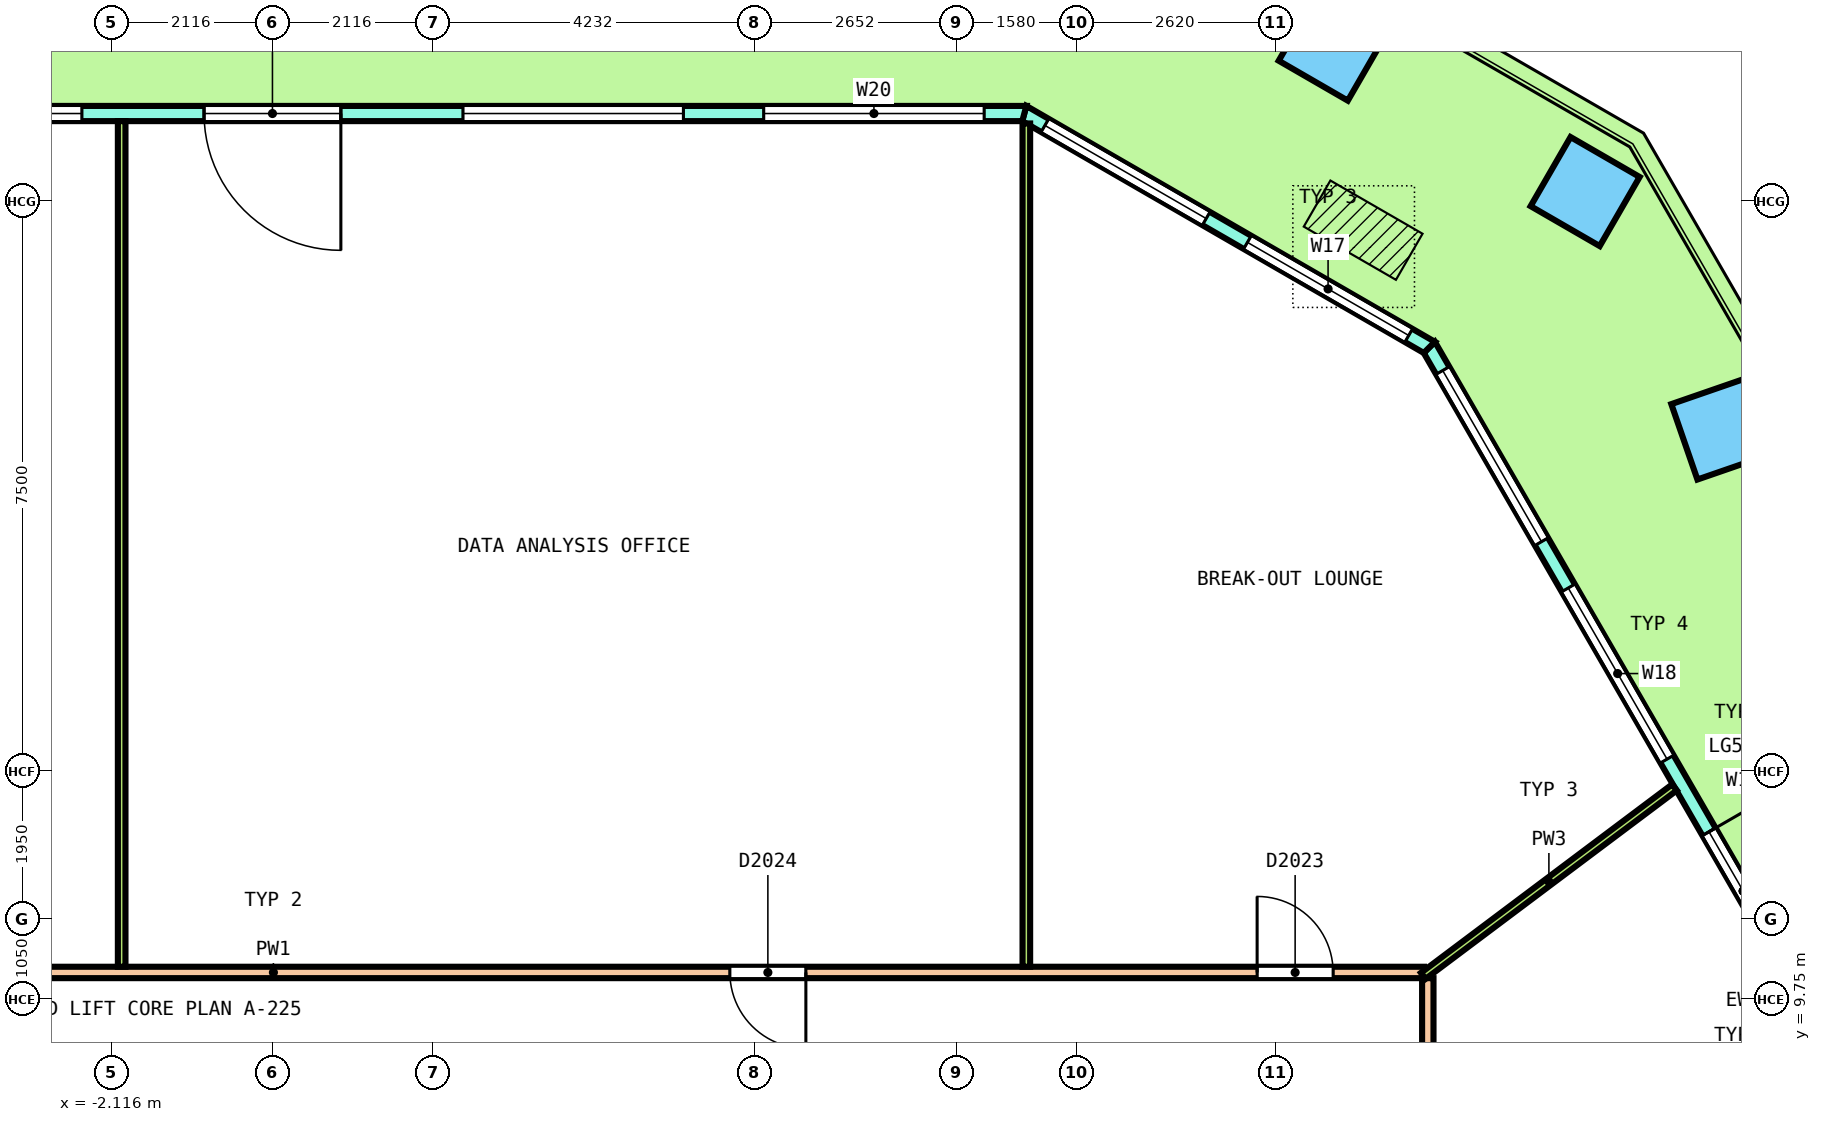
"""IFC4 building model, lengths in metres.
Left out: names, types, materials, properties, quantities, classifications, styles, units other than length and angle.
Written with IfcOpenShell. Run it as: python <this file> out.ifc"""

import sys

from ifc_helpers import new_model, si_unit, direction, frame, frame_2d, origin, origin_2d, place, context, subcontext, project, spatial, polyline, rectangle, outline, extrude, element, fill, save


model = new_model("IFC4")
c1 = context("Model", 3, precision=1e-05, world=origin(), true_north=direction((0.0, 1.0)))
c2 = subcontext(c1, "Body", "Model", "MODEL_VIEW")
j1 = project(units=[si_unit("LENGTHUNIT", "METRE"), si_unit("PLANEANGLEUNIT", "RADIAN")], contexts=[c1])
p1 = place(None, origin())
s1 = spatial("IfcSite", under=j1, at=p1, CompositionType="ELEMENT")
p2 = place(p1, origin())
s2 = spatial("IfcBuilding", under=s1, at=p2, CompositionType="ELEMENT")
p3 = place(p2, frame((0.0, 0.0, 241.4)))
s3 = spatial("IfcBuildingStorey", under=s2, at=p3, CompositionType="ELEMENT", Elevation=241.4)
p4 = place(p3, frame((19.072, 17.252, 0.0), z_axis=(0.032688717128, 0.006283720675, 0.99944582776), x_axis=(-0.499189907536, 0.866424302438, 0.010879538516)))
e1 = element("IfcColumn", 1, at=p4, inside=s3, PredefinedType="COLUMN", context=c2, shape_type="SweptSolid", body=[
    extrude(rectangle(XDim=1.05, YDim=1.05, at=origin_2d()), origin(), (0.0, 0.0, 1.0), 3.652),
])
for number, where, z_axis, x_axis in (
    (2, (17.27, 20.373, 0.0), (0.036, 0.0, 0.999), (-0.865, 0.5, 0.031)),
    (3, (13.956, 22.287, 0.0), (0.036, 0.0, 0.999), (-0.865, 0.5, 0.031)),
):
    element("IfcColumn", number, at=place(p3, frame(where, z_axis=z_axis, x_axis=x_axis)), inside=s3, PredefinedType="COLUMN", context=c2, shape_type="SweptSolid", body=[
        extrude(rectangle(XDim=1.05, YDim=1.05, at=origin_2d()), origin(), (0.0, 0.0, 1.0), 3.653),
    ])
p5 = place(p3, frame((23.479, 4.019, 0.0), z_axis=(0.0, 0.0, 1.0), x_axis=(-0.500000529106, 0.866025098304, 0.0)))
e4 = element("IfcWall", 4, at=p5, inside=s3, PredefinedType="SOLIDWALL", context=c2, shape_type="SweptSolid", body=[
    extrude(outline(polyline([(-0.027, -0.1), (1.009, -0.1), (2.044, -0.1), (3.08, -0.1), (4.116, -0.1), (5.152, -0.1), (6.187, -0.1), (7.223, -0.1), (8.259, -0.1), (9.294, -0.1), (10.33, -0.1), (11.365, -0.1), (12.401, -0.1), (13.437, -0.1), (14.473, -0.1), (15.508, -0.1), (16.544, -0.1), (16.49, 0.1), (15.461, 0.1), (14.432, 0.1), (13.403, 0.1), (12.375, 0.1), (11.345, 0.1), (10.316, 0.1), (9.288, 0.1), (8.259, 0.1), (7.229, 0.1), (6.201, 0.1), (5.172, 0.1), (4.143, 0.1), (3.114, 0.1), (2.085, 0.1), (1.056, 0.1), (0.027, 0.1), (-0.027, -0.1)])), origin(), (0.0, 0.0, 1.0), 3.7),
])
p6 = place(p5, frame((0.352, 0.0, 0.1)))
e5 = element("IfcOpeningElement", 5, at=p6, cuts=e4, PredefinedType="OPENING", context=c2, shape_type="SweptSolid", body=[
    extrude(rectangle(XDim=2.6, YDim=2.65, at=frame_2d((1.3, 1.325))), frame((0.0, 0.11, 0.0), z_axis=(0.0, -1.0, 0.0), x_axis=(1.0, 0.0, 0.0)), (0.0, 0.0, 1.0), 0.22),
])
p7 = place(p5, frame((3.655, 0.0, 0.1)))
e6 = element("IfcOpeningElement", 6, at=p7, cuts=e4, PredefinedType="OPENING", context=c2, shape_type="SweptSolid", body=[
    extrude(rectangle(XDim=2.6, YDim=2.65, at=frame_2d((1.3, 1.325))), frame((0.0, 0.11, 0.0), z_axis=(0.0, -1.0, 0.0), x_axis=(1.0, 0.0, 0.0)), (0.0, 0.0, 1.0), 0.22),
])
p8 = place(p5, frame((7.359, 0.0, 0.0)))
e7 = element("IfcOpeningElement", 7, at=p8, cuts=e4, PredefinedType="OPENING", context=c2, shape_type="SweptSolid", body=[
    extrude(rectangle(XDim=1.8, YDim=2.4, at=frame_2d((0.9, 1.2))), frame((0.0, 0.11, 0.0), z_axis=(0.0, -1.0, 0.0), x_axis=(1.0, 0.0, 0.0)), (0.0, 0.0, 1.0), 0.22),
])
p9 = place(p5, frame((7.359, 0.0, 2.55)))
e8 = element("IfcOpeningElement", 8, at=p9, cuts=e4, PredefinedType="OPENING", context=c2, shape_type="SweptSolid", body=[
    extrude(rectangle(XDim=1.8, YDim=0.2, at=frame_2d((0.9, 0.1))), frame((0.0, 0.11, 0.0), z_axis=(0.0, -1.0, 0.0), x_axis=(1.0, 0.0, 0.0)), (0.0, 0.0, 1.0), 0.22),
])
p10 = place(p5, frame((10.262, 0.0, 0.1)))
e9 = element("IfcOpeningElement", 9, at=p10, cuts=e4, PredefinedType="OPENING", context=c2, shape_type="SweptSolid", body=[
    extrude(rectangle(XDim=2.6, YDim=2.65, at=frame_2d((1.3, 1.325))), frame((0.0, 0.11, 0.0), z_axis=(0.0, -1.0, 0.0), x_axis=(1.0, 0.0, 0.0)), (0.0, 0.0, 1.0), 0.22),
])
p11 = place(p5, frame((13.565, 0.0, 0.1)))
e10 = element("IfcOpeningElement", 10, at=p11, cuts=e4, PredefinedType="OPENING", context=c2, shape_type="SweptSolid", body=[
    extrude(rectangle(XDim=2.6, YDim=2.65, at=frame_2d((1.3, 1.325))), frame((0.0, 0.11, 0.0), z_axis=(0.0, -1.0, 0.0), x_axis=(1.0, 0.0, 0.0)), (0.0, 0.0, 1.0), 0.22),
])
p12 = place(p3, frame((15.22, 18.323, 0.0), z_axis=(0.0, 0.0, 1.0), x_axis=(-0.866029647142, 0.499992650217, 0.0)))
e11 = element("IfcWall", 11, at=p12, inside=s3, PredefinedType="SOLIDWALL", context=c2, shape_type="SweptSolid", body=[
    extrude(outline(polyline([(-0.027, -0.1), (1.008, -0.1), (2.042, -0.1), (3.076, -0.1), (4.111, -0.1), (5.145, -0.1), (6.18, -0.1), (6.126, 0.1), (5.109, 0.1), (4.093, 0.1), (3.076, 0.1), (2.06, 0.1), (1.043, 0.1), (0.027, 0.1), (-0.027, -0.1)])), origin(), (0.0, 0.0, 1.0), 3.7),
])
p13 = place(p12, frame((0.313, 0.0, 0.1)))
e12 = element("IfcOpeningElement", 12, at=p13, cuts=e11, PredefinedType="OPENING", context=c2, shape_type="SweptSolid", body=[
    extrude(rectangle(XDim=2.45, YDim=2.65, at=frame_2d((1.225, 1.325))), frame((0.0, 0.11, 0.0), z_axis=(0.0, -1.0, 0.0), x_axis=(1.0, 0.0, 0.0)), (0.0, 0.0, 1.0), 0.22),
])
p14 = place(p12, frame((3.39, 0.0, 0.1)))
e13 = element("IfcOpeningElement", 13, at=p14, cuts=e11, PredefinedType="OPENING", context=c2, shape_type="SweptSolid", body=[
    extrude(rectangle(XDim=2.45, YDim=2.65, at=frame_2d((1.225, 1.325))), frame((0.0, 0.11, 0.0), z_axis=(0.0, -1.0, 0.0), x_axis=(1.0, 0.0, 0.0)), (0.0, 0.0, 1.0), 0.22),
])
p15 = place(p3, frame((9.892, 21.4, 0.0), z_axis=(0.0, 0.0, 1.0), x_axis=(-1.0, 0.0, 0.0)))
e14 = element("IfcWall", 14, at=p15, inside=s3, PredefinedType="SOLIDWALL", context=c2, shape_type="SweptSolid", body=[
    extrude(outline(polyline([(-0.027, -0.1), (1.017, -0.1), (2.061, -0.1), (3.105, -0.1), (4.149, -0.1), (5.193, -0.1), (6.238, -0.1), (7.281, -0.1), (8.325, -0.1), (9.37, -0.1), (10.414, -0.1), (11.458, -0.1), (12.502, -0.1), (13.546, -0.1), (14.59, -0.1), (15.634, -0.1), (16.678, -0.1), (17.722, -0.1), (18.766, -0.1), (19.81, -0.1), (19.756, 0.1), (18.718, 0.1), (17.679, 0.1), (16.641, 0.1), (15.603, 0.1), (14.564, 0.1), (13.526, 0.1), (12.488, 0.1), (11.449, 0.1), (10.411, 0.1), (9.372, 0.1), (8.334, 0.1), (7.296, 0.1), (6.257, 0.1), (5.219, 0.1), (4.18, 0.1), (3.142, 0.1), (2.104, 0.1), (1.065, 0.1), (0.027, 0.1), (-0.027, -0.1)])), origin(), (0.0, 0.0, 1.0), 3.7),
])
p16 = place(p15, frame((0.528, 0.0, 0.1)))
e15 = element("IfcOpeningElement", 15, at=p16, cuts=e14, PredefinedType="OPENING", context=c2, shape_type="SweptSolid", body=[
    extrude(rectangle(XDim=2.9, YDim=2.65, at=frame_2d((1.45, 1.325))), frame((0.0, 0.11, 0.0), z_axis=(0.0, -1.0, 0.0), x_axis=(1.0, 0.0, 0.0)), (0.0, 0.0, 1.0), 0.22),
])
p17 = place(p15, frame((4.485, 0.0, 0.1)))
e16 = element("IfcOpeningElement", 16, at=p17, cuts=e14, PredefinedType="OPENING", context=c2, shape_type="SweptSolid", body=[
    extrude(rectangle(XDim=2.9, YDim=2.65, at=frame_2d((1.45, 1.325))), frame((0.0, 0.11, 0.0), z_axis=(0.0, -1.0, 0.0), x_axis=(1.0, 0.0, 0.0)), (0.0, 0.0, 1.0), 0.22),
])
p18 = place(p15, frame((8.991, 0.0, 0.0)))
e17 = element("IfcOpeningElement", 17, at=p18, cuts=e14, PredefinedType="OPENING", context=c2, shape_type="SweptSolid", body=[
    extrude(rectangle(XDim=1.8, YDim=2.4, at=frame_2d((0.9, 1.2))), frame((0.0, 0.11, 0.0), z_axis=(0.0, -1.0, 0.0), x_axis=(1.0, 0.0, 0.0)), (0.0, 0.0, 1.0), 0.22),
])
p19 = place(p15, frame((8.991, 0.0, 2.55)))
e18 = element("IfcOpeningElement", 18, at=p19, cuts=e14, PredefinedType="OPENING", context=c2, shape_type="SweptSolid", body=[
    extrude(rectangle(XDim=1.8, YDim=0.2, at=frame_2d((0.9, 0.1))), frame((0.0, 0.11, 0.0), z_axis=(0.0, -1.0, 0.0), x_axis=(1.0, 0.0, 0.0)), (0.0, 0.0, 1.0), 0.22),
])
p20 = place(p15, frame((12.398, 0.0, 0.1)))
e19 = element("IfcOpeningElement", 19, at=p20, cuts=e14, PredefinedType="OPENING", context=c2, shape_type="SweptSolid", body=[
    extrude(rectangle(XDim=2.9, YDim=2.65, at=frame_2d((1.45, 1.325))), frame((0.0, 0.11, 0.0), z_axis=(0.0, -1.0, 0.0), x_axis=(1.0, 0.0, 0.0)), (0.0, 0.0, 1.0), 0.22),
])
p21 = place(p15, frame((16.355, 0.0, 0.1)))
e20 = element("IfcOpeningElement", 20, at=p21, cuts=e14, PredefinedType="OPENING", context=c2, shape_type="SweptSolid", body=[
    extrude(rectangle(XDim=2.9, YDim=2.65, at=frame_2d((1.45, 1.325))), frame((0.0, 0.11, 0.0), z_axis=(0.0, -1.0, 0.0), x_axis=(1.0, 0.0, 0.0)), (0.0, 0.0, 1.0), 0.22),
])
p22 = place(p3, frame((15.2, -7.075, 0.0), z_axis=(0.0, 0.0, 1.0), x_axis=(0.0, 1.0, 0.0)))
e21 = element("IfcWall", 21, at=p22, inside=s3, PredefinedType="PARTITIONING", context=c2, shape_type="SweptSolid", body=[
    extrude(rectangle(XDim=17.1, YDim=0.15, at=frame_2d((8.55, 0.0))), origin(), (0.0, 0.0, 1.0), 2.8),
])
p23 = place(p22, frame((7.418, 0.0, 0.0)))
e22 = element("IfcOpeningElement", 22, at=p23, cuts=e21, PredefinedType="OPENING", context=c2, shape_type="SweptSolid", body=[
    extrude(rectangle(XDim=1.2, YDim=2.1, at=frame_2d((0.6, 1.05))), frame((0.0, 0.085, 0.0), z_axis=(0.0, -1.0, 0.0), x_axis=(1.0, 0.0, 0.0)), (0.0, 0.0, 1.0), 0.17),
])
p24 = place(p22, frame((12.815, 0.0, 0.0)))
e23 = element("IfcOpeningElement", 23, at=p24, cuts=e21, PredefinedType="OPENING", context=c2, shape_type="SweptSolid", body=[
    extrude(rectangle(XDim=1.2, YDim=2.1, at=frame_2d((0.6, 1.05))), frame((0.0, 0.085, 0.0), z_axis=(0.0, -1.0, 0.0), x_axis=(1.0, 0.0, 0.0)), (0.0, 0.0, 1.0), 0.17),
])
p25 = place(p22, frame((2.742, 0.0, 0.0)))
e24 = element("IfcOpeningElement", 24, at=p25, cuts=e21, PredefinedType="OPENING", context=c2, shape_type="SweptSolid", body=[
    extrude(rectangle(XDim=1.0, YDim=2.1, at=frame_2d((0.5, 1.05))), frame((0.0, 0.085, 0.0), z_axis=(0.0, -1.0, 0.0), x_axis=(1.0, 0.0, 0.0)), (0.0, 0.0, 1.0), 0.17),
])
p26 = place(p3, frame((-15.125, 10.1, 0.0), z_axis=(0.0, 0.0, 1.0), x_axis=(1.0, 0.0, 0.0)))
e25 = element("IfcWall", 25, at=p26, inside=s3, PredefinedType="PARTITIONING", context=c2, shape_type="SweptSolid", body=[
    extrude(rectangle(XDim=30.275, YDim=0.15, at=frame_2d((15.137, 0.0))), origin(), (0.0, 0.0, 1.0), 2.8),
])
p27 = place(p26, frame((28.08, 0.0, 0.0)))
e26 = element("IfcOpeningElement", 26, at=p27, cuts=e25, PredefinedType="OPENING", context=c2, shape_type="SweptSolid", body=[
    extrude(rectangle(XDim=1.0, YDim=2.1, at=frame_2d((0.5, 1.05))), frame((0.0, 0.085, 0.0), z_axis=(0.0, -1.0, 0.0), x_axis=(1.0, 0.0, 0.0)), (0.0, 0.0, 1.0), 0.17),
])
p28 = place(p26, frame((21.143, 0.0, 0.0)))
e27 = element("IfcOpeningElement", 27, at=p28, cuts=e25, PredefinedType="OPENING", context=c2, shape_type="SweptSolid", body=[
    extrude(rectangle(XDim=1.0, YDim=2.1, at=frame_2d((0.5, 1.05))), frame((0.0, 0.085, 0.0), z_axis=(0.0, -1.0, 0.0), x_axis=(1.0, 0.0, 0.0)), (0.0, 0.0, 1.0), 0.17),
])
p29 = place(p26, frame((4.236, 0.0, 0.0)))
e28 = element("IfcOpeningElement", 28, at=p29, cuts=e25, PredefinedType="OPENING", context=c2, shape_type="SweptSolid", body=[
    extrude(rectangle(XDim=1.2, YDim=2.1, at=frame_2d((0.6, 1.05))), frame((0.0, 0.085, 0.0), z_axis=(0.0, -1.0, 0.0), x_axis=(1.0, 0.0, 0.0)), (0.0, 0.0, 1.0), 0.17),
])
p30 = place(p3, frame((15.14, 10.055, 0.0), z_axis=(0.0, 0.0, 1.0), x_axis=(0.799893673581, 0.600141742395, 0.0)))
e29 = element("IfcWall", 29, at=p30, inside=s3, PredefinedType="PARTITIONING", context=c2, shape_type="SweptSolid", body=[
    extrude(rectangle(XDim=4.134, YDim=0.1, at=frame_2d((2.067, 0.0))), origin(), (0.0, 0.0, 1.0), 2.8),
])
p31 = place(p3, frame((9.918, 10.175, 0.0), z_axis=(0.0, 0.0, 1.0), x_axis=(0.0, 1.0, 0.0)))
e30 = element("IfcWall", 30, at=p31, inside=s3, PredefinedType="PARTITIONING", context=c2, shape_type="SweptSolid", body=[
    extrude(rectangle(XDim=11.094, YDim=0.1, at=frame_2d((5.547, 0.0))), origin(), (0.0, 0.0, 1.0), 2.8),
])
p32 = place(p3, frame((-1.984, 10.175, 0.0), z_axis=(0.0, 0.0, 1.0), x_axis=(0.0, 1.0, 0.0)))
e31 = element("IfcWall", 31, at=p32, inside=s3, PredefinedType="PARTITIONING", context=c2, shape_type="SweptSolid", body=[
    extrude(rectangle(XDim=11.125, YDim=0.1, at=frame_2d((5.562, 0.0))), origin(), (0.0, 0.0, 1.0), 2.8),
])
p33 = place(p8, origin())
e32 = element("IfcDoor", 32, at=p33, inside=s3, OperationType="DOUBLE_DOOR_SINGLE_SWING", PredefinedType="DOOR", context=c2, shape_type="SweptSolid", body=[
    extrude(rectangle(XDim=1.8, YDim=2.4, at=frame_2d((0.9, 1.2))), frame((0.0, 0.025, 0.0), z_axis=(0.0, -1.0, 0.0), x_axis=(1.0, 0.0, 0.0)), (0.0, 0.0, 1.0), 0.05),
])
fill(e7, e32)
p34 = place(p9, origin())
e33 = element("IfcWindow", 33, at=p34, inside=s3, PartitioningType="SINGLE_PANEL", PredefinedType="WINDOW", context=c2, shape_type="SweptSolid", body=[
    extrude(rectangle(XDim=1.8, YDim=0.2, at=frame_2d((0.9, 0.1))), frame((0.0, 0.03, 0.0), z_axis=(0.0, -1.0, 0.0), x_axis=(1.0, 0.0, 0.0)), (0.0, 0.0, 1.0), 0.06),
])
fill(e8, e33)
p35 = place(p10, origin())
e34 = element("IfcWindow", 34, at=p35, inside=s3, PartitioningType="SINGLE_PANEL", PredefinedType="WINDOW", context=c2, shape_type="SweptSolid", body=[
    extrude(rectangle(XDim=2.6, YDim=2.65, at=frame_2d((1.3, 1.325))), frame((0.0, 0.03, 0.0), z_axis=(0.0, -1.0, 0.0), x_axis=(1.0, 0.0, 0.0)), (0.0, 0.0, 1.0), 0.06),
])
fill(e9, e34)
p36 = place(p11, origin())
e35 = element("IfcWindow", 35, at=p36, inside=s3, PartitioningType="SINGLE_PANEL", PredefinedType="WINDOW", context=c2, shape_type="SweptSolid", body=[
    extrude(rectangle(XDim=2.6, YDim=2.65, at=frame_2d((1.3, 1.325))), frame((0.0, 0.03, 0.0), z_axis=(0.0, -1.0, 0.0), x_axis=(1.0, 0.0, 0.0)), (0.0, 0.0, 1.0), 0.06),
])
fill(e10, e35)
p37 = place(p13, origin())
e36 = element("IfcWindow", 36, at=p37, inside=s3, PartitioningType="SINGLE_PANEL", PredefinedType="WINDOW", context=c2, shape_type="SweptSolid", body=[
    extrude(rectangle(XDim=2.45, YDim=2.65, at=frame_2d((1.225, 1.325))), frame((0.0, 0.03, 0.0), z_axis=(0.0, -1.0, 0.0), x_axis=(1.0, 0.0, 0.0)), (0.0, 0.0, 1.0), 0.06),
])
fill(e12, e36)
p38 = place(p14, origin())
e37 = element("IfcWindow", 37, at=p38, inside=s3, PartitioningType="SINGLE_PANEL", PredefinedType="WINDOW", context=c2, shape_type="SweptSolid", body=[
    extrude(rectangle(XDim=2.45, YDim=2.65, at=frame_2d((1.225, 1.325))), frame((0.0, 0.03, 0.0), z_axis=(0.0, -1.0, 0.0), x_axis=(1.0, 0.0, 0.0)), (0.0, 0.0, 1.0), 0.06),
])
fill(e13, e37)
p39 = place(p16, origin())
e38 = element("IfcWindow", 38, at=p39, inside=s3, PartitioningType="SINGLE_PANEL", PredefinedType="WINDOW", context=c2, shape_type="SweptSolid", body=[
    extrude(rectangle(XDim=2.9, YDim=2.65, at=frame_2d((1.45, 1.325))), frame((0.0, 0.03, 0.0), z_axis=(0.0, -1.0, 0.0), x_axis=(1.0, 0.0, 0.0)), (0.0, 0.0, 1.0), 0.06),
])
fill(e15, e38)
p40 = place(p17, origin())
e39 = element("IfcWindow", 39, at=p40, inside=s3, PartitioningType="SINGLE_PANEL", PredefinedType="WINDOW", context=c2, shape_type="SweptSolid", body=[
    extrude(rectangle(XDim=2.9, YDim=2.65, at=frame_2d((1.45, 1.325))), frame((0.0, 0.03, 0.0), z_axis=(0.0, -1.0, 0.0), x_axis=(1.0, 0.0, 0.0)), (0.0, 0.0, 1.0), 0.06),
])
fill(e16, e39)
p41 = place(p18, origin())
e40 = element("IfcDoor", 40, at=p41, inside=s3, OperationType="DOUBLE_DOOR_SINGLE_SWING", PredefinedType="DOOR", context=c2, shape_type="SweptSolid", body=[
    extrude(rectangle(XDim=1.8, YDim=2.4, at=frame_2d((0.9, 1.2))), frame((0.0, 0.025, 0.0), z_axis=(0.0, -1.0, 0.0), x_axis=(1.0, 0.0, 0.0)), (0.0, 0.0, 1.0), 0.05),
])
fill(e17, e40)
p42 = place(p19, origin())
e41 = element("IfcWindow", 41, at=p42, inside=s3, PartitioningType="SINGLE_PANEL", PredefinedType="WINDOW", context=c2, shape_type="SweptSolid", body=[
    extrude(rectangle(XDim=1.8, YDim=0.2, at=frame_2d((0.9, 0.1))), frame((0.0, 0.03, 0.0), z_axis=(0.0, -1.0, 0.0), x_axis=(1.0, 0.0, 0.0)), (0.0, 0.0, 1.0), 0.06),
])
fill(e18, e41)
p43 = place(p20, origin())
e42 = element("IfcWindow", 42, at=p43, inside=s3, PartitioningType="SINGLE_PANEL", PredefinedType="WINDOW", context=c2, shape_type="SweptSolid", body=[
    extrude(rectangle(XDim=2.9, YDim=2.65, at=frame_2d((1.45, 1.325))), frame((0.0, 0.03, 0.0), z_axis=(0.0, -1.0, 0.0), x_axis=(1.0, 0.0, 0.0)), (0.0, 0.0, 1.0), 0.06),
])
fill(e19, e42)
p44 = place(p27, origin())
e43 = element("IfcDoor", 43, at=p44, inside=s3, OperationType="SINGLE_SWING_LEFT", PredefinedType="DOOR", context=c2, shape_type="SweptSolid", body=[
    extrude(rectangle(XDim=1.0, YDim=2.1, at=frame_2d((0.5, 1.05))), frame((0.0, 0.025, 0.0), z_axis=(0.0, -1.0, 0.0), x_axis=(1.0, 0.0, 0.0)), (0.0, 0.0, 1.0), 0.05),
])
fill(e26, e43)
p45 = place(p28, origin())
e44 = element("IfcDoor", 44, at=p45, inside=s3, OperationType="SINGLE_SWING_LEFT", PredefinedType="DOOR", context=c2, shape_type="SweptSolid", body=[
    extrude(rectangle(XDim=1.0, YDim=2.1, at=frame_2d((0.5, 1.05))), frame((0.0, 0.025, 0.0), z_axis=(0.0, -1.0, 0.0), x_axis=(1.0, 0.0, 0.0)), (0.0, 0.0, 1.0), 0.05),
])
fill(e27, e44)
save(model, sys.argv[1])
